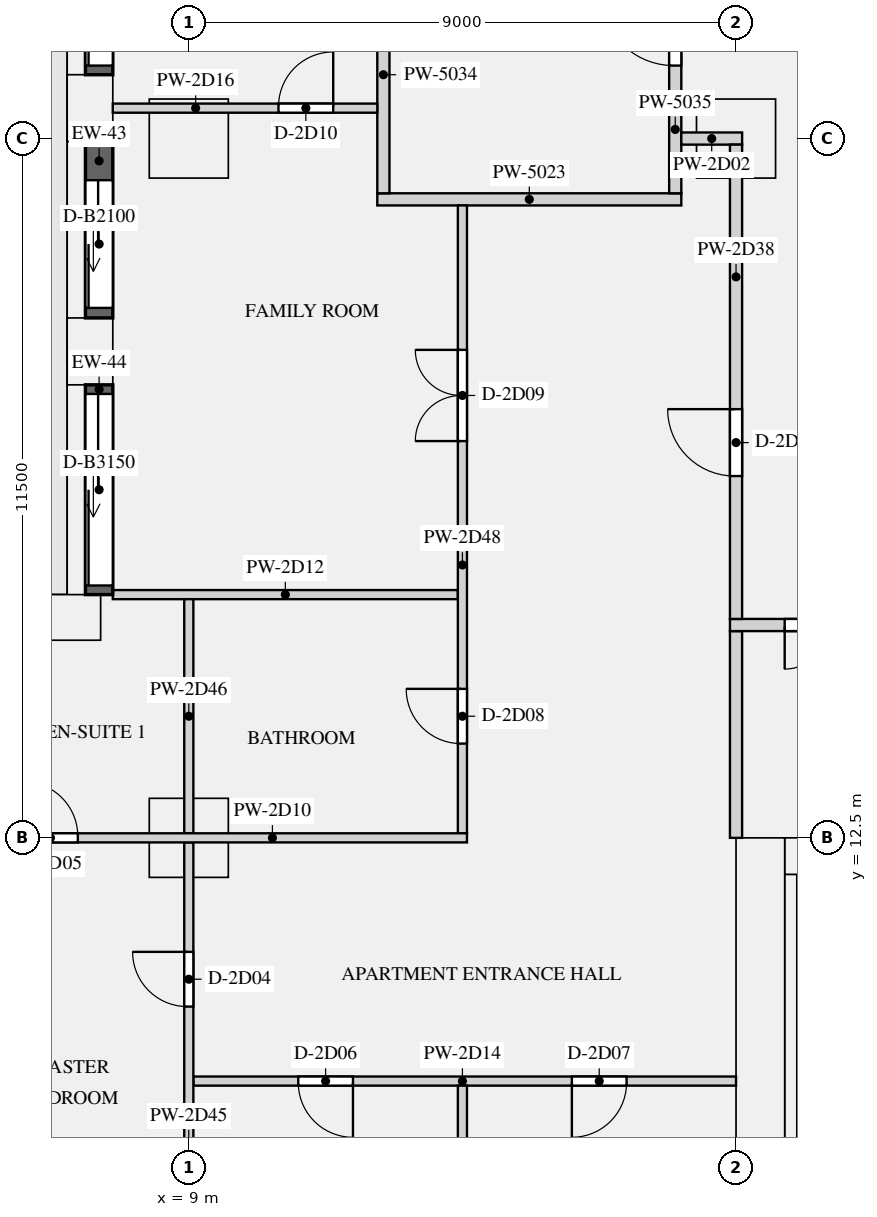
"""IFC4 building model, lengths in metres.
Left out: names, types, materials, properties, quantities, classifications, styles, units other than length and angle.
Written with IfcOpenShell. Run it as: python <this file> out.ifc"""

import sys

from ifc_helpers import new_model, si_unit, direction, frame, frame_2d, origin, origin_2d, place, context, subcontext, project, spatial, rectangle, extrude, element, fill, save


model = new_model("IFC4")
c1 = context("Model", 3, precision=1e-05, world=origin(), true_north=direction((0.0, 1.0)))
c2 = subcontext(c1, "Body", "Model", "MODEL_VIEW")
j1 = project(units=[si_unit("LENGTHUNIT", "METRE"), si_unit("PLANEANGLEUNIT", "RADIAN")], contexts=[c1])
p1 = place(None, origin())
s1 = spatial("IfcSite", under=j1, at=p1, CompositionType="ELEMENT")
p2 = place(p1, origin())
s2 = spatial("IfcBuilding", under=s1, at=p2, CompositionType="ELEMENT")
p3 = place(p2, frame((0.0, 0.0, 111.9)))
s3 = spatial("IfcBuildingStorey", under=s2, at=p3, CompositionType="ELEMENT", Elevation=111.9)
for number, where, z_axis, x_axis in (
    (1, (7.375, 24.5, 0.0), (0.0, 0.0, 1.0), (0.0, -1.0, 0.0)),
    (2, (7.375, 20.5, 0.0), (0.0, 0.0, 1.0), (0.0, -1.0, 0.0)),
    (3, (7.0, 16.125, 0.0), (0.0, 0.0, 1.0), (-1.0, 0.0, 0.0)),
):
    element("IfcColumn", number, at=place(p3, frame(where, z_axis=z_axis, x_axis=x_axis)), inside=s3, PredefinedType="USERDEFINED", context=c2, shape_type="SweptSolid", body=[
        extrude(rectangle(XDim=1.1, YDim=0.75, at=origin_2d()), origin(), (0.0, 0.0, 1.0), 3.15),
    ])
for number, where, z_axis, x_axis in (
    (4, (9.0, 24.0, 0.0), (0.0, 0.0, 1.0), (1.0, 0.0, 0.0)),
    (5, (18.0, 24.0, 0.0), (0.0, 0.0, 1.0), (1.0, 0.0, 0.0)),
    (6, (9.0, 12.5, 0.0), (0.0, 0.0, 1.0), (1.0, 0.0, 0.0)),
):
    element("IfcColumn", number, at=place(p3, frame(where, z_axis=z_axis, x_axis=x_axis)), inside=s3, PredefinedType="COLUMN", context=c2, shape_type="SweptSolid", body=[
        extrude(rectangle(XDim=1.3, YDim=1.3, at=origin_2d()), origin(), (0.0, 0.0, 1.0), 3.15),
    ])
p4 = place(p3, frame((18.4, 0.0, 0.0), z_axis=(0.0, 0.0, 1.0), x_axis=(0.0, 1.0, 0.0)))
e7 = element("IfcWall", 7, at=p4, inside=s3, PredefinedType="SHEAR", context=c2, shape_type="SweptSolid", body=[
    extrude(rectangle(XDim=12.5, YDim=0.8, at=frame_2d((6.25, 0.0))), origin(), (0.0, 0.0, 1.0), 3.15),
])
p5 = place(p3, frame((18.8, 12.2, 0.0), z_axis=(0.0, 0.0, 1.0), x_axis=(1.0, 0.0, 0.0)))
e8 = element("IfcWall", 8, at=p5, inside=s3, PredefinedType="SHEAR", context=c2, shape_type="SweptSolid", body=[
    extrude(rectangle(XDim=34.4, YDim=0.6, at=frame_2d((17.2, 0.0))), origin(), (0.0, 0.0, 1.0), 3.15),
])
p6 = place(p5, frame((24.375, 0.0, 0.0)))
e9 = element("IfcOpeningElement", 9, at=p6, cuts=e8, PredefinedType="OPENING", context=c2, shape_type="SweptSolid", body=[
    extrude(rectangle(XDim=1.1, YDim=2.1, at=frame_2d((0.55, 1.05))), frame((0.0, 0.31, 0.0), z_axis=(0.0, -1.0, 0.0), x_axis=(1.0, 0.0, 0.0)), (0.0, 0.0, 1.0), 0.62),
])
p7 = place(p5, frame((26.625, 0.0, 0.0)))
e10 = element("IfcOpeningElement", 10, at=p7, cuts=e8, PredefinedType="OPENING", context=c2, shape_type="SweptSolid", body=[
    extrude(rectangle(XDim=1.1, YDim=2.1, at=frame_2d((0.55, 1.05))), frame((0.0, 0.31, 0.0), z_axis=(0.0, -1.0, 0.0), x_axis=(1.0, 0.0, 0.0)), (0.0, 0.0, 1.0), 0.62),
])
p8 = place(p5, frame((28.875, 0.0, 0.0)))
e11 = element("IfcOpeningElement", 11, at=p8, cuts=e8, PredefinedType="OPENING", context=c2, shape_type="SweptSolid", body=[
    extrude(rectangle(XDim=1.1, YDim=2.1, at=frame_2d((0.55, 1.05))), frame((0.0, 0.31, 0.0), z_axis=(0.0, -1.0, 0.0), x_axis=(1.0, 0.0, 0.0)), (0.0, 0.0, 1.0), 0.62),
])
p9 = place(p5, frame((8.75, 0.0, 0.0)))
e12 = element("IfcOpeningElement", 12, at=p9, cuts=e8, PredefinedType="OPENING", context=c2, shape_type="SweptSolid", body=[
    extrude(rectangle(XDim=0.9, YDim=2.1, at=frame_2d((0.45, 1.05))), frame((0.0, 0.31, 0.0), z_axis=(0.0, -1.0, 0.0), x_axis=(1.0, 0.0, 0.0)), (0.0, 0.0, 1.0), 0.62),
])
p10 = place(p5, frame((1.35, 0.0, 0.0)))
e13 = element("IfcOpeningElement", 13, at=p10, cuts=e8, PredefinedType="OPENING", context=c2, shape_type="SweptSolid", body=[
    extrude(rectangle(XDim=1.2, YDim=2.1, at=frame_2d((0.6, 1.05))), frame((0.0, 0.31, 0.0), z_axis=(0.0, -1.0, 0.0), x_axis=(1.0, 0.0, 0.0)), (0.0, 0.0, 1.0), 0.62),
])
p11 = place(p5, frame((31.85, 0.0, 0.0)))
e14 = element("IfcOpeningElement", 14, at=p11, cuts=e8, PredefinedType="OPENING", context=c2, shape_type="SweptSolid", body=[
    extrude(rectangle(XDim=1.2, YDim=2.1, at=frame_2d((0.6, 1.05))), frame((0.0, 0.31, 0.0), z_axis=(0.0, -1.0, 0.0), x_axis=(1.0, 0.0, 0.0)), (0.0, 0.0, 1.0), 0.62),
])
p12 = place(p3, frame((18.9, 1.0, 0.0), z_axis=(0.0, 0.0, 1.0), x_axis=(0.0, 1.0, 0.0)))
e15 = element("IfcWall", 15, at=p12, inside=s3, PredefinedType="SHEAR", context=c2, shape_type="SweptSolid", body=[
    extrude(rectangle(XDim=10.9, YDim=0.2, at=frame_2d((5.45, 0.0))), origin(), (0.0, 0.0, 1.0), 3.15),
])
p13 = place(p3, frame((7.525, 27.95, 0.0), z_axis=(0.0, 0.0, 1.0), x_axis=(0.0, -1.0, 0.0)))
e16 = element("IfcWall", 16, at=p13, inside=s3, PredefinedType="SOLIDWALL", context=c2, shape_type="SweptSolid", body=[
    extrude(rectangle(XDim=2.9, YDim=0.45, at=frame_2d((1.45, 0.0))), origin(), (0.0, 0.0, 1.0), 2.83),
])
p14 = place(p13, frame((0.15, 0.0, 0.0)))
e17 = element("IfcOpeningElement", 17, at=p14, cuts=e16, PredefinedType="OPENING", context=c2, shape_type="SweptSolid", body=[
    extrude(rectangle(XDim=2.6, YDim=2.3, at=frame_2d((1.3, 1.15))), frame((0.0, 0.235, 0.0), z_axis=(0.0, -1.0, 0.0), x_axis=(1.0, 0.0, 0.0)), (0.0, 0.0, 1.0), 0.47),
])
p15 = place(p3, frame((7.525, 23.95, 0.0), z_axis=(0.0, 0.0, 1.0), x_axis=(0.0, -1.0, 0.0)))
e18 = element("IfcWall", 18, at=p15, inside=s3, PredefinedType="SOLIDWALL", context=c2, shape_type="SweptSolid", body=[
    extrude(rectangle(XDim=2.9, YDim=0.45, at=frame_2d((1.45, 0.0))), origin(), (0.0, 0.0, 1.0), 2.83),
])
p16 = place(p15, frame((0.635, 0.0, 0.0)))
e19 = element("IfcOpeningElement", 19, at=p16, cuts=e18, PredefinedType="OPENING", context=c2, shape_type="SweptSolid", body=[
    extrude(rectangle(XDim=2.1, YDim=2.3, at=frame_2d((1.05, 1.15))), frame((0.0, 0.235, 0.0), z_axis=(0.0, -1.0, 0.0), x_axis=(1.0, 0.0, 0.0)), (0.0, 0.0, 1.0), 0.47),
])
p17 = place(p3, frame((7.525, 19.95, 0.0), z_axis=(0.0, 0.0, 1.0), x_axis=(0.0, -1.0, 0.0)))
e20 = element("IfcWall", 20, at=p17, inside=s3, PredefinedType="SOLIDWALL", context=c2, shape_type="SweptSolid", body=[
    extrude(rectangle(XDim=3.45, YDim=0.45, at=frame_2d((1.725, 0.0))), origin(), (0.0, 0.0, 1.0), 2.83),
])
p18 = place(p17, frame((0.15, 0.0, 0.0)))
e21 = element("IfcOpeningElement", 21, at=p18, cuts=e20, PredefinedType="OPENING", context=c2, shape_type="SweptSolid", body=[
    extrude(rectangle(XDim=3.15, YDim=2.3, at=frame_2d((1.575, 1.15))), frame((0.0, 0.235, 0.0), z_axis=(0.0, -1.0, 0.0), x_axis=(1.0, 0.0, 0.0)), (0.0, 0.0, 1.0), 0.47),
])
p19 = place(p3, frame((12.1, 23.0, 0.0), z_axis=(0.0, 0.0, 1.0), x_axis=(1.0, 0.0, 0.0)))
e22 = element("IfcWall", 22, at=p19, inside=s3, PredefinedType="PARTITIONING", context=c2, shape_type="SweptSolid", body=[
    extrude(rectangle(XDim=5.0, YDim=0.2, at=frame_2d((2.5, 0.0))), origin(), (0.0, 0.0, 1.0), 2.83),
])
p20 = place(p3, frame((18.0, 12.5, 0.0), z_axis=(0.0, 0.0, 1.0), x_axis=(0.0, 1.0, 0.0)))
e23 = element("IfcWall", 23, at=p20, inside=s3, PredefinedType="PARTITIONING", context=c2, shape_type="SweptSolid", body=[
    extrude(rectangle(XDim=3.4, YDim=0.2, at=frame_2d((1.7, 0.0))), origin(), (0.0, 0.0, 1.0), 2.83),
])
p21 = place(p3, frame((12.2, 23.1, 0.0), z_axis=(0.0, 0.0, 1.0), x_axis=(0.0, 1.0, 0.0)))
e24 = element("IfcWall", 24, at=p21, inside=s3, PredefinedType="PARTITIONING", context=c2, shape_type="SweptSolid", body=[
    extrude(rectangle(XDim=3.9, YDim=0.2, at=frame_2d((1.95, 0.0))), origin(), (0.0, 0.0, 1.0), 2.83),
])
p22 = place(p3, frame((17.0, 23.1, 0.0), z_axis=(0.0, 0.0, 1.0), x_axis=(0.0, 1.0, 0.0)))
e25 = element("IfcWall", 25, at=p22, inside=s3, PredefinedType="PARTITIONING", context=c2, shape_type="SweptSolid", body=[
    extrude(rectangle(XDim=3.8, YDim=0.2, at=frame_2d((1.9, 0.0))), origin(), (0.0, 0.0, 1.0), 2.83),
])
p23 = place(p22, frame((2.1, 0.0, 0.0)))
e26 = element("IfcOpeningElement", 26, at=p23, cuts=e25, PredefinedType="OPENING", context=c2, shape_type="SweptSolid", body=[
    extrude(rectangle(XDim=1.2, YDim=2.1, at=frame_2d((0.6, 1.05))), frame((0.0, 0.11, 0.0), z_axis=(0.0, -1.0, 0.0), x_axis=(1.0, 0.0, 0.0)), (0.0, 0.0, 1.0), 0.22),
])
p24 = place(p3, frame((17.1, 24.0, 0.0), z_axis=(0.0, 0.0, 1.0), x_axis=(1.0, 0.0, 0.0)))
e27 = element("IfcWall", 27, at=p24, inside=s3, PredefinedType="PARTITIONING", context=c2, shape_type="SweptSolid", body=[
    extrude(rectangle(XDim=1.0, YDim=0.2, at=frame_2d((0.5, 0.0))), origin(), (0.0, 0.0, 1.0), 2.83),
])
p25 = place(p3, frame((5.25, 12.5, 0.0), z_axis=(0.0, 0.0, 1.0), x_axis=(1.0, 0.0, 0.0)))
e28 = element("IfcWall", 28, at=p25, inside=s3, PredefinedType="PARTITIONING", context=c2, shape_type="SweptSolid", body=[
    extrude(rectangle(XDim=8.325, YDim=0.15, at=frame_2d((4.163, 0.0))), origin(), (0.0, 0.0, 1.0), 2.83),
])
p26 = place(p25, frame((1.025, 0.0, 0.0)))
e29 = element("IfcOpeningElement", 29, at=p26, cuts=e28, PredefinedType="OPENING", context=c2, shape_type="SweptSolid", body=[
    extrude(rectangle(XDim=0.9, YDim=2.1, at=frame_2d((0.45, 1.05))), frame((0.0, 0.085, 0.0), z_axis=(0.0, -1.0, 0.0), x_axis=(1.0, 0.0, 0.0)), (0.0, 0.0, 1.0), 0.17),
])
p27 = place(p3, frame((7.75, 16.5, 0.0), z_axis=(0.0, 0.0, 1.0), x_axis=(1.0, 0.0, 0.0)))
e30 = element("IfcWall", 30, at=p27, inside=s3, PredefinedType="PARTITIONING", context=c2, shape_type="SweptSolid", body=[
    extrude(rectangle(XDim=5.675, YDim=0.15, at=frame_2d((2.837, 0.0))), origin(), (0.0, 0.0, 1.0), 2.83),
])
p28 = place(p3, frame((9.075, 8.5, 0.0), z_axis=(0.0, 0.0, 1.0), x_axis=(1.0, 0.0, 0.0)))
e31 = element("IfcWall", 31, at=p28, inside=s3, PredefinedType="PARTITIONING", context=c2, shape_type="SweptSolid", body=[
    extrude(rectangle(XDim=8.925, YDim=0.15, at=frame_2d((4.462, 0.0))), origin(), (0.0, 0.0, 1.0), 2.83),
])
p29 = place(p28, frame((1.725, 0.0, 0.0)))
e32 = element("IfcOpeningElement", 32, at=p29, cuts=e31, PredefinedType="OPENING", context=c2, shape_type="SweptSolid", body=[
    extrude(rectangle(XDim=0.9, YDim=2.1, at=frame_2d((0.45, 1.05))), frame((0.0, 0.085, 0.0), z_axis=(0.0, -1.0, 0.0), x_axis=(1.0, 0.0, 0.0)), (0.0, 0.0, 1.0), 0.17),
])
p30 = place(p28, frame((6.225, 0.0, 0.0)))
e33 = element("IfcOpeningElement", 33, at=p30, cuts=e31, PredefinedType="OPENING", context=c2, shape_type="SweptSolid", body=[
    extrude(rectangle(XDim=0.9, YDim=2.1, at=frame_2d((0.45, 1.05))), frame((0.0, 0.085, 0.0), z_axis=(0.0, -1.0, 0.0), x_axis=(1.0, 0.0, 0.0)), (0.0, 0.0, 1.0), 0.17),
])
p31 = place(p3, frame((7.75, 24.5, 0.0), z_axis=(0.0, 0.0, 1.0), x_axis=(1.0, 0.0, 0.0)))
e34 = element("IfcWall", 34, at=p31, inside=s3, PredefinedType="PARTITIONING", context=c2, shape_type="SweptSolid", body=[
    extrude(rectangle(XDim=4.35, YDim=0.15, at=frame_2d((2.175, 0.0))), origin(), (0.0, 0.0, 1.0), 2.83),
])
p32 = place(p31, frame((2.725, 0.0, 0.0)))
e35 = element("IfcOpeningElement", 35, at=p32, cuts=e34, PredefinedType="OPENING", context=c2, shape_type="SweptSolid", body=[
    extrude(rectangle(XDim=0.9, YDim=2.1, at=frame_2d((0.45, 1.05))), frame((0.0, 0.085, 0.0), z_axis=(0.0, -1.0, 0.0), x_axis=(1.0, 0.0, 0.0)), (0.0, 0.0, 1.0), 0.17),
])
p33 = place(p3, frame((17.9, 16.0, 0.0), z_axis=(0.0, 0.0, 1.0), x_axis=(1.0, 0.0, 0.0)))
e36 = element("IfcWall", 36, at=p33, inside=s3, PredefinedType="PARTITIONING", context=c2, shape_type="SweptSolid", body=[
    extrude(rectangle(XDim=36.2, YDim=0.2, at=frame_2d((18.1, 0.0))), origin(), (0.0, 0.0, 1.0), 2.83),
])
p34 = place(p33, frame((0.9, 0.0, 0.0)))
e37 = element("IfcOpeningElement", 37, at=p34, cuts=e36, PredefinedType="OPENING", context=c2, shape_type="SweptSolid", body=[
    extrude(rectangle(XDim=1.4, YDim=2.1, at=frame_2d((0.7, 1.05))), frame((0.0, 0.11, 0.0), z_axis=(0.0, -1.0, 0.0), x_axis=(1.0, 0.0, 0.0)), (0.0, 0.0, 1.0), 0.22),
])
p35 = place(p33, frame((33.9, 0.0, 0.0)))
e38 = element("IfcOpeningElement", 38, at=p35, cuts=e36, PredefinedType="OPENING", context=c2, shape_type="SweptSolid", body=[
    extrude(rectangle(XDim=1.4, YDim=2.1, at=frame_2d((0.7, 1.05))), frame((0.0, 0.11, 0.0), z_axis=(0.0, -1.0, 0.0), x_axis=(1.0, 0.0, 0.0)), (0.0, 0.0, 1.0), 0.22),
])
p36 = place(p3, frame((18.0, 16.1, 0.0), z_axis=(0.0, 0.0, 1.0), x_axis=(0.0, 1.0, 0.0)))
e39 = element("IfcWall", 39, at=p36, inside=s3, PredefinedType="PARTITIONING", context=c2, shape_type="SweptSolid", body=[
    extrude(rectangle(XDim=7.8, YDim=0.2, at=frame_2d((3.9, 0.0))), origin(), (0.0, 0.0, 1.0), 2.83),
])
p37 = place(p36, frame((2.35, 0.0, 0.0)))
e40 = element("IfcOpeningElement", 40, at=p37, cuts=e39, PredefinedType="OPENING", context=c2, shape_type="SweptSolid", body=[
    extrude(rectangle(XDim=1.1, YDim=2.1, at=frame_2d((0.55, 1.05))), frame((0.0, 0.11, 0.0), z_axis=(0.0, -1.0, 0.0), x_axis=(1.0, 0.0, 0.0)), (0.0, 0.0, 1.0), 0.22),
])
p38 = place(p3, frame((9.0, 5.25, 0.0), z_axis=(0.0, 0.0, 1.0), x_axis=(0.0, 1.0, 0.0)))
e41 = element("IfcWall", 41, at=p38, inside=s3, PredefinedType="PARTITIONING", context=c2, shape_type="SweptSolid", body=[
    extrude(rectangle(XDim=7.175, YDim=0.15, at=frame_2d((3.587, 0.0))), origin(), (0.0, 0.0, 1.0), 2.83),
])
p39 = place(p38, frame((4.475, 0.0, 0.0)))
e42 = element("IfcOpeningElement", 42, at=p39, cuts=e41, PredefinedType="OPENING", context=c2, shape_type="SweptSolid", body=[
    extrude(rectangle(XDim=0.9, YDim=2.1, at=frame_2d((0.45, 1.05))), frame((0.0, 0.085, 0.0), z_axis=(0.0, -1.0, 0.0), x_axis=(1.0, 0.0, 0.0)), (0.0, 0.0, 1.0), 0.17),
])
p40 = place(p3, frame((9.0, 12.575, 0.0), z_axis=(0.0, 0.0, 1.0), x_axis=(0.0, 1.0, 0.0)))
e43 = element("IfcWall", 43, at=p40, inside=s3, PredefinedType="PARTITIONING", context=c2, shape_type="SweptSolid", body=[
    extrude(rectangle(XDim=3.85, YDim=0.15, at=frame_2d((1.925, 0.0))), origin(), (0.0, 0.0, 1.0), 2.83),
])
p41 = place(p3, frame((13.5, 0.75, 0.0), z_axis=(0.0, 0.0, 1.0), x_axis=(0.0, 1.0, 0.0)))
e44 = element("IfcWall", 44, at=p41, inside=s3, PredefinedType="PARTITIONING", context=c2, shape_type="SweptSolid", body=[
    extrude(rectangle(XDim=7.675, YDim=0.15, at=frame_2d((3.837, 0.0))), origin(), (0.0, 0.0, 1.0), 2.83),
])
p42 = place(p3, frame((13.5, 12.575, 0.0), z_axis=(0.0, 0.0, 1.0), x_axis=(0.0, 1.0, 0.0)))
e45 = element("IfcWall", 45, at=p42, inside=s3, PredefinedType="PARTITIONING", context=c2, shape_type="SweptSolid", body=[
    extrude(rectangle(XDim=10.325, YDim=0.15, at=frame_2d((5.163, 0.0))), origin(), (0.0, 0.0, 1.0), 2.83),
])
p43 = place(p42, frame((1.475, 0.0, 0.0)))
e46 = element("IfcOpeningElement", 46, at=p43, cuts=e45, PredefinedType="OPENING", context=c2, shape_type="SweptSolid", body=[
    extrude(rectangle(XDim=0.9, YDim=2.1, at=frame_2d((0.45, 1.05))), frame((0.0, 0.085, 0.0), z_axis=(0.0, -1.0, 0.0), x_axis=(1.0, 0.0, 0.0)), (0.0, 0.0, 1.0), 0.17),
])
p44 = place(p42, frame((6.45, 0.0, 0.0)))
e47 = element("IfcOpeningElement", 47, at=p44, cuts=e45, PredefinedType="OPENING", context=c2, shape_type="SweptSolid", body=[
    extrude(rectangle(XDim=1.5, YDim=2.1, at=frame_2d((0.75, 1.05))), frame((0.0, 0.085, 0.0), z_axis=(0.0, -1.0, 0.0), x_axis=(1.0, 0.0, 0.0)), (0.0, 0.0, 1.0), 0.17),
])
p45 = place(p14, origin())
e48 = element("IfcDoor", 48, at=p45, inside=s3, OperationType="SLIDING_TO_LEFT", PredefinedType="DOOR", context=c2, shape_type="SweptSolid", body=[
    extrude(rectangle(XDim=2.6, YDim=2.3, at=frame_2d((1.3, 1.15))), frame((0.0, -0.07, 0.0), z_axis=(0.0, -1.0, 0.0), x_axis=(1.0, 0.0, 0.0)), (0.0, 0.0, 1.0), 0.05),
])
fill(e17, e48)
p46 = place(p16, origin())
e49 = element("IfcDoor", 49, at=p46, inside=s3, OperationType="SLIDING_TO_LEFT", PredefinedType="DOOR", context=c2, shape_type="SweptSolid", body=[
    extrude(rectangle(XDim=2.1, YDim=2.3, at=frame_2d((1.05, 1.15))), frame((0.0, -0.07, 0.0), z_axis=(0.0, -1.0, 0.0), x_axis=(1.0, 0.0, 0.0)), (0.0, 0.0, 1.0), 0.05),
])
fill(e19, e49)
p47 = place(p18, origin())
e50 = element("IfcDoor", 50, at=p47, inside=s3, OperationType="SLIDING_TO_LEFT", PredefinedType="DOOR", context=c2, shape_type="SweptSolid", body=[
    extrude(rectangle(XDim=3.15, YDim=2.3, at=frame_2d((1.575, 1.15))), frame((0.0, -0.07, 0.0), z_axis=(0.0, -1.0, 0.0), x_axis=(1.0, 0.0, 0.0)), (0.0, 0.0, 1.0), 0.05),
])
fill(e21, e50)
p48 = place(p23, origin())
e51 = element("IfcDoor", 51, at=p48, inside=s3, OperationType="SINGLE_SWING_RIGHT", PredefinedType="DOOR", context=c2, shape_type="SweptSolid", body=[
    extrude(rectangle(XDim=1.2, YDim=2.1, at=frame_2d((0.6, 1.05))), frame((0.0, 0.025, 0.0), z_axis=(0.0, -1.0, 0.0), x_axis=(1.0, 0.0, 0.0)), (0.0, 0.0, 1.0), 0.05),
])
fill(e26, e51)
p49 = place(p34, frame((1.4, 0.0, 0.0), z_axis=(0.0, 0.0, 1.0), x_axis=(-1.0, 0.0, 0.0)))
e52 = element("IfcDoor", 52, at=p49, inside=s3, OperationType="DOUBLE_DOOR_SINGLE_SWING", PredefinedType="DOOR", context=c2, shape_type="SweptSolid", body=[
    extrude(rectangle(XDim=1.4, YDim=2.1, at=frame_2d((0.7, 1.05))), frame((0.0, 0.025, 0.0), z_axis=(0.0, -1.0, 0.0), x_axis=(1.0, 0.0, 0.0)), (0.0, 0.0, 1.0), 0.05),
])
fill(e37, e52)
p50 = place(p37, origin())
e53 = element("IfcDoor", 53, at=p50, inside=s3, OperationType="SINGLE_SWING_RIGHT", PredefinedType="DOOR", context=c2, shape_type="SweptSolid", body=[
    extrude(rectangle(XDim=1.1, YDim=2.1, at=frame_2d((0.55, 1.05))), frame((0.0, 0.025, 0.0), z_axis=(0.0, -1.0, 0.0), x_axis=(1.0, 0.0, 0.0)), (0.0, 0.0, 1.0), 0.05),
])
fill(e40, e53)
p51 = place(p39, origin())
e54 = element("IfcDoor", 54, at=p51, inside=s3, OperationType="SINGLE_SWING_RIGHT", PredefinedType="DOOR", context=c2, shape_type="SweptSolid", body=[
    extrude(rectangle(XDim=0.9, YDim=2.1, at=frame_2d((0.45, 1.05))), frame((0.0, 0.025, 0.0), z_axis=(0.0, -1.0, 0.0), x_axis=(1.0, 0.0, 0.0)), (0.0, 0.0, 1.0), 0.05),
])
fill(e42, e54)
p52 = place(p26, origin())
e55 = element("IfcDoor", 55, at=p52, inside=s3, OperationType="SINGLE_SWING_LEFT", PredefinedType="DOOR", context=c2, shape_type="SweptSolid", body=[
    extrude(rectangle(XDim=0.9, YDim=2.1, at=frame_2d((0.45, 1.05))), frame((0.0, 0.025, 0.0), z_axis=(0.0, -1.0, 0.0), x_axis=(1.0, 0.0, 0.0)), (0.0, 0.0, 1.0), 0.05),
])
fill(e29, e55)
p53 = place(p29, frame((0.9, 0.0, 0.0), z_axis=(0.0, 0.0, 1.0), x_axis=(-1.0, 0.0, 0.0)))
e56 = element("IfcDoor", 56, at=p53, inside=s3, OperationType="SINGLE_SWING_LEFT", PredefinedType="DOOR", context=c2, shape_type="SweptSolid", body=[
    extrude(rectangle(XDim=0.9, YDim=2.1, at=frame_2d((0.45, 1.05))), frame((0.0, 0.025, 0.0), z_axis=(0.0, -1.0, 0.0), x_axis=(1.0, 0.0, 0.0)), (0.0, 0.0, 1.0), 0.05),
])
fill(e32, e56)
p54 = place(p30, frame((0.9, 0.0, 0.0), z_axis=(0.0, 0.0, 1.0), x_axis=(-1.0, 0.0, 0.0)))
e57 = element("IfcDoor", 57, at=p54, inside=s3, OperationType="SINGLE_SWING_RIGHT", PredefinedType="DOOR", context=c2, shape_type="SweptSolid", body=[
    extrude(rectangle(XDim=0.9, YDim=2.1, at=frame_2d((0.45, 1.05))), frame((0.0, 0.025, 0.0), z_axis=(0.0, -1.0, 0.0), x_axis=(1.0, 0.0, 0.0)), (0.0, 0.0, 1.0), 0.05),
])
fill(e33, e57)
p55 = place(p43, origin())
e58 = element("IfcDoor", 58, at=p55, inside=s3, OperationType="SINGLE_SWING_RIGHT", PredefinedType="DOOR", context=c2, shape_type="SweptSolid", body=[
    extrude(rectangle(XDim=0.9, YDim=2.1, at=frame_2d((0.45, 1.05))), frame((0.0, 0.025, 0.0), z_axis=(0.0, -1.0, 0.0), x_axis=(1.0, 0.0, 0.0)), (0.0, 0.0, 1.0), 0.05),
])
fill(e46, e58)
p56 = place(p44, origin())
e59 = element("IfcDoor", 59, at=p56, inside=s3, OperationType="DOUBLE_DOOR_SINGLE_SWING", PredefinedType="DOOR", context=c2, shape_type="SweptSolid", body=[
    extrude(rectangle(XDim=1.5, YDim=2.1, at=frame_2d((0.75, 1.05))), frame((0.0, 0.025, 0.0), z_axis=(0.0, -1.0, 0.0), x_axis=(1.0, 0.0, 0.0)), (0.0, 0.0, 1.0), 0.05),
])
fill(e47, e59)
p57 = place(p32, origin())
e60 = element("IfcDoor", 60, at=p57, inside=s3, OperationType="SINGLE_SWING_RIGHT", PredefinedType="DOOR", context=c2, shape_type="SweptSolid", body=[
    extrude(rectangle(XDim=0.9, YDim=2.1, at=frame_2d((0.45, 1.05))), frame((0.0, 0.025, 0.0), z_axis=(0.0, -1.0, 0.0), x_axis=(1.0, 0.0, 0.0)), (0.0, 0.0, 1.0), 0.05),
])
fill(e35, e60)
save(model, sys.argv[1])
